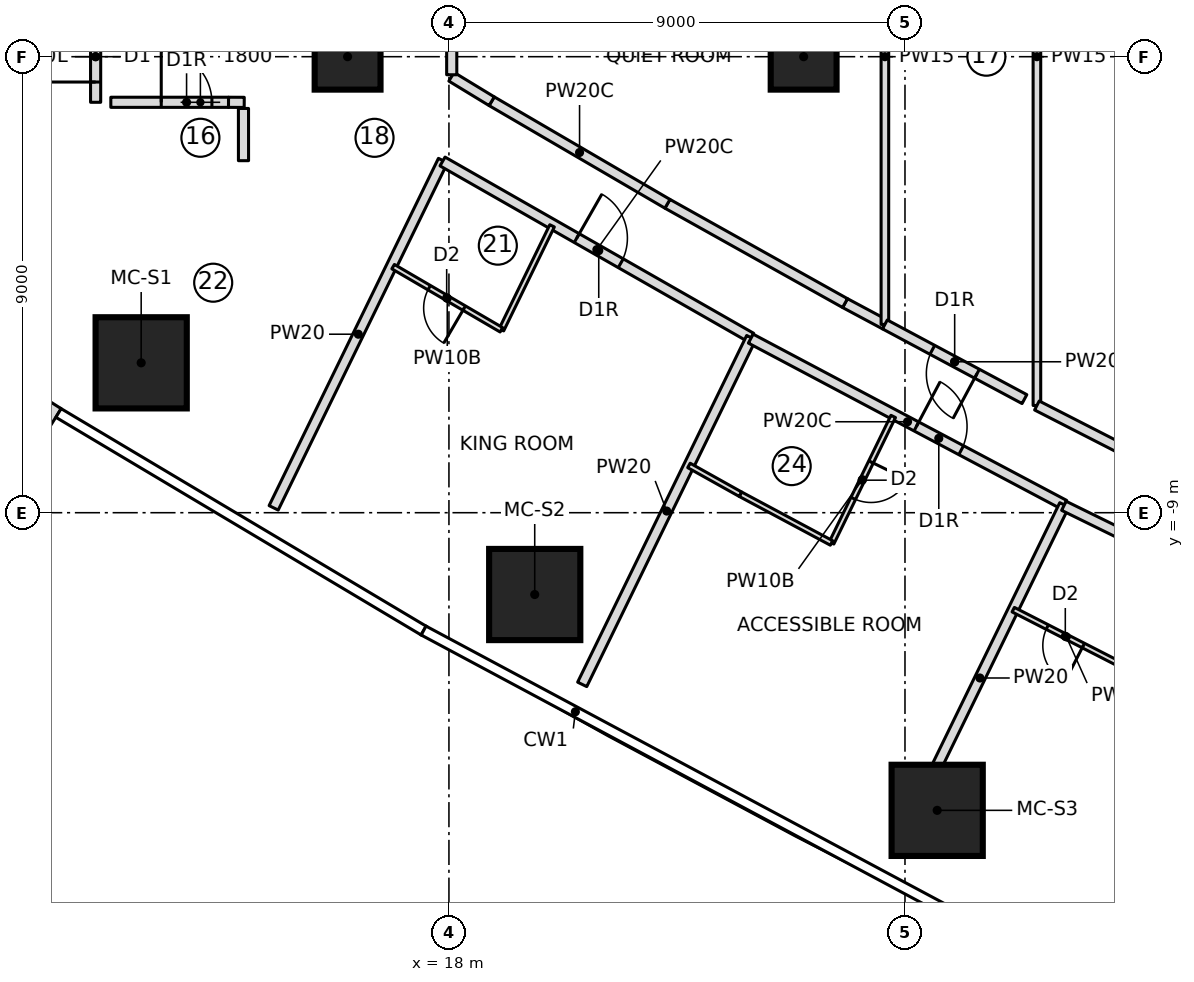
"""IFC4 building model, lengths in metres.
Left out: names, types, materials, properties, quantities, classifications, styles, units other than length and angle.
Written with IfcOpenShell. Run it as: python <this file> out.ifc"""

import sys

from ifc_helpers import new_model, si_unit, direction, frame, frame_2d, origin, origin_2d, place, context, subcontext, project, spatial, polyline, rectangle, outline, extrude, element, fill, save


model = new_model("IFC4")
c1 = context("Model", 3, precision=1e-05, world=origin(), true_north=direction((0.0, 1.0)))
c2 = subcontext(c1, "Body", "Model", "MODEL_VIEW")
j1 = project(units=[si_unit("LENGTHUNIT", "METRE"), si_unit("PLANEANGLEUNIT", "RADIAN")], contexts=[c1])
p1 = place(None, origin())
s1 = spatial("IfcSite", under=j1, at=p1, CompositionType="ELEMENT")
p2 = place(p1, origin())
s2 = spatial("IfcBuilding", under=s1, at=p2, CompositionType="ELEMENT")
p3 = place(p2, frame((0.0, 0.0, 71.55)))
s3 = spatial("IfcBuildingStorey", under=s2, at=p3, CompositionType="ELEMENT", Elevation=71.55)
for number, where, z_axis, x_axis in (
    (1, (11.927, -6.042, 0.0), (0.0, 0.0, 1.0), (1.0, 0.0, 0.0)),
    (2, (19.693, -10.615, 0.0), (0.0, 0.0, 1.0), (1.0, 0.0, 0.0)),
    (3, (27.635, -14.874, 0.0), (0.0, 0.0, 1.0), (1.0, 0.0, 0.0)),
):
    element("IfcColumn", number, at=place(p3, frame(where, z_axis=z_axis, x_axis=x_axis)), inside=s3, PredefinedType="COLUMN", context=c2, shape_type="SweptSolid", body=[
        extrude(rectangle(XDim=1.8, YDim=1.8, at=origin_2d()), origin(), (0.0, 0.0, 1.0), 3.55),
    ])
for number, where, z_axis, x_axis in (
    (4, (16.0, 0.0, 0.0), (0.0, 0.0, 1.0), (1.0, 0.0, 0.0)),
    (5, (25.0, 0.0, 0.0), (0.0, 0.0, 1.0), (1.0, 0.0, 0.0)),
):
    element("IfcColumn", number, at=place(p3, frame(where, z_axis=z_axis, x_axis=x_axis)), inside=s3, PredefinedType="COLUMN", context=c2, shape_type="SweptSolid", body=[
        extrude(rectangle(XDim=1.3, YDim=1.3, at=origin_2d()), origin(), (0.0, 0.0, 1.0), 3.55),
    ])
p4 = place(p3, frame((6.698, -4.87, 0.0), z_axis=(0.0, 0.0, 1.0), x_axis=(0.844551578623, -0.535474211372, 0.0)))
e6 = element("IfcWall", 6, at=p4, inside=s3, PredefinedType="NOTDEFINED", context=c2, shape_type="SweptSolid", body=[
    extrude(outline(polyline([(-0.034, -0.2), (4.196, -0.2), (4.196, 0.2), (0.034, 0.2), (-0.034, -0.2)])), origin(), (0.0, 0.0, 1.0), 3.25),
])
p5 = place(p4, frame((0.998, 0.0, 0.6)))
e7 = element("IfcOpeningElement", 7, at=p5, cuts=e6, PredefinedType="OPENING", context=c2, shape_type="SweptSolid", body=[
    extrude(outline(polyline([(0.0, 1.35), (0.084, 1.771), (0.322, 2.128), (0.679, 2.366), (1.1, 2.45), (1.521, 2.366), (1.878, 2.128), (2.116, 1.771), (2.2, 1.35), (2.2, 1.1), (2.116, 0.679), (1.878, 0.322), (1.521, 0.084), (1.1, 0.0), (0.679, 0.084), (0.322, 0.322), (0.084, 0.679), (0.0, 1.1), (0.0, 1.35)])), frame((0.0, 0.21, 0.0), z_axis=(0.0, -1.0, 0.0), x_axis=(1.0, 0.0, 0.0)), (0.0, 0.0, 1.0), 0.42),
])
p6 = place(p3, frame((11.027, -0.9, 0.0), z_axis=(0.0, 0.0, 1.0), x_axis=(0.0, 1.0, 0.0)))
e8 = element("IfcWall", 8, at=p6, inside=s3, PredefinedType="PARTITIONING", context=c2, shape_type="SweptSolid", body=[
    extrude(rectangle(XDim=1.8, YDim=0.2, at=frame_2d((0.9, 0.0))), origin(), (0.0, 0.0, 1.0), 3.15),
])
p7 = place(p6, frame((0.4, 0.0, 0.0)))
e9 = element("IfcOpeningElement", 9, at=p7, cuts=e8, PredefinedType="OPENING", context=c2, shape_type="SweptSolid", body=[
    extrude(rectangle(XDim=1.0, YDim=2.1, at=frame_2d((0.5, 1.05))), frame((0.0, 0.11, 0.0), z_axis=(0.0, -1.0, 0.0), x_axis=(1.0, 0.0, 0.0)), (0.0, 0.0, 1.0), 0.22),
])
p8 = place(p3, frame((14.541, -8.904, 0.0), z_axis=(0.0, 0.0, 1.0), x_axis=(0.438213564788, 0.898870887078, 0.0)))
e10 = element("IfcWall", 10, at=p8, inside=s3, PredefinedType="PARTITIONING", context=c2, shape_type="SweptSolid", body=[
    extrude(rectangle(XDim=7.625, YDim=0.2, at=frame_2d((3.813, 0.0))), origin(), (0.0, 0.0, 1.0), 3.15),
])
p9 = place(p3, frame((17.874, -2.068, 0.0), z_axis=(0.0, 0.0, 1.0), x_axis=(0.868427275315, -0.495816566373, 0.0)))
e11 = element("IfcWall", 11, at=p9, inside=s3, PredefinedType="PARTITIONING", context=c2, shape_type="SweptSolid", body=[
    extrude(rectangle(XDim=7.015, YDim=0.2, at=frame_2d((3.507, 0.0))), origin(), (0.0, 0.0, 1.0), 3.15),
])
p10 = place(p9, frame((3.05, 0.0, 0.0)))
e12 = element("IfcOpeningElement", 12, at=p10, cuts=e11, PredefinedType="OPENING", context=c2, shape_type="SweptSolid", body=[
    extrude(rectangle(XDim=1.0, YDim=2.1, at=frame_2d((0.5, 1.05))), frame((0.0, 0.11, 0.0), z_axis=(0.0, -1.0, 0.0), x_axis=(1.0, 0.0, 0.0)), (0.0, 0.0, 1.0), 0.22),
])
p11 = place(p3, frame((20.035, -3.338, 0.0), z_axis=(0.0, 0.0, 1.0), x_axis=(-0.438122322582, -0.898915363344, 0.0)))
e13 = element("IfcWall", 13, at=p11, inside=s3, PredefinedType="PARTITIONING", context=c2, shape_type="SweptSolid", body=[
    extrude(rectangle(XDim=2.283, YDim=0.1, at=frame_2d((1.142, 0.0))), origin(), (0.0, 0.0, 1.0), 3.15),
])
p12 = place(p3, frame((19.035, -5.39, 0.0), z_axis=(0.0, 0.0, 1.0), x_axis=(-0.863707305865, 0.503993739837, 0.0)))
e14 = element("IfcWall", 14, at=p12, inside=s3, PredefinedType="PARTITIONING", context=c2, shape_type="SweptSolid", body=[
    extrude(rectangle(XDim=2.474, YDim=0.1, at=frame_2d((1.237, 0.0))), origin(), (0.0, 0.0, 1.0), 3.15),
])
p13 = place(p12, frame((0.85, 0.0, 0.0)))
e15 = element("IfcOpeningElement", 15, at=p13, cuts=e14, PredefinedType="OPENING", context=c2, shape_type="SweptSolid", body=[
    extrude(rectangle(XDim=0.8, YDim=2.1, at=frame_2d((0.4, 1.05))), frame((0.0, 0.06, 0.0), z_axis=(0.0, -1.0, 0.0), x_axis=(1.0, 0.0, 0.0)), (0.0, 0.0, 1.0), 0.12),
])
p14 = place(p3, frame((20.63, -12.388, 0.0), z_axis=(0.0, 0.0, 1.0), x_axis=(0.438184754816, 0.898884931816, 0.0)))
e16 = element("IfcWall", 16, at=p14, inside=s3, PredefinedType="PARTITIONING", context=c2, shape_type="SweptSolid", body=[
    extrude(rectangle(XDim=7.612, YDim=0.2, at=frame_2d((3.806, 0.0))), origin(), (0.0, 0.0, 1.0), 3.15),
])
p15 = place(p3, frame((23.957, -5.564, 0.0), z_axis=(0.0, 0.0, 1.0), x_axis=(0.883455325405, -0.468515408513, 0.0)))
e17 = element("IfcWall", 17, at=p15, inside=s3, PredefinedType="PARTITIONING", context=c2, shape_type="SweptSolid", body=[
    extrude(rectangle(XDim=7.004, YDim=0.2, at=frame_2d((3.502, 0.0))), origin(), (0.0, 0.0, 1.0), 3.15),
])
p16 = place(p15, frame((3.7, 0.0, 0.0)))
e18 = element("IfcOpeningElement", 18, at=p16, cuts=e17, PredefinedType="OPENING", context=c2, shape_type="SweptSolid", body=[
    extrude(rectangle(XDim=1.0, YDim=2.1, at=frame_2d((0.5, 1.05))), frame((0.0, 0.11, 0.0), z_axis=(0.0, -1.0, 0.0), x_axis=(1.0, 0.0, 0.0)), (0.0, 0.0, 1.0), 0.22),
])
p17 = place(p3, frame((26.768, -7.1, 0.0), z_axis=(0.0, 0.0, 1.0), x_axis=(-0.43822975423, -0.898862994292, 0.0)))
e19 = element("IfcWall", 19, at=p17, inside=s3, PredefinedType="PARTITIONING", context=c2, shape_type="SweptSolid", body=[
    extrude(rectangle(XDim=2.779, YDim=0.1, at=frame_2d((1.389, 0.0))), origin(), (0.0, 0.0, 1.0), 3.15),
])
p18 = place(p17, frame((1.0, 0.0, 0.0)))
e20 = element("IfcOpeningElement", 20, at=p18, cuts=e19, PredefinedType="OPENING", context=c2, shape_type="SweptSolid", body=[
    extrude(rectangle(XDim=0.8, YDim=2.1, at=frame_2d((0.4, 1.05))), frame((0.0, 0.06, 0.0), z_axis=(0.0, -1.0, 0.0), x_axis=(1.0, 0.0, 0.0)), (0.0, 0.0, 1.0), 0.12),
])
p19 = place(p3, frame((25.55, -9.597, 0.0), z_axis=(0.0, 0.0, 1.0), x_axis=(-0.881675736231, 0.471855800156, 0.0)))
e21 = element("IfcWall", 21, at=p19, inside=s3, PredefinedType="PARTITIONING", context=c2, shape_type="SweptSolid", body=[
    extrude(rectangle(XDim=2.039, YDim=0.1, at=frame_2d((1.019, 0.0))), origin(), (0.0, 0.0, 1.0), 3.15),
])
p20 = place(p3, frame((23.753, -8.635, 0.0), z_axis=(0.0, 0.0, 1.0), x_axis=(-0.872799020153, 0.488079778745, 0.0)))
e22 = element("IfcWall", 22, at=p20, inside=s3, PredefinedType="PARTITIONING", context=c2, shape_type="SweptSolid", body=[
    extrude(rectangle(XDim=1.165, YDim=0.1, at=frame_2d((0.582, 0.0))), origin(), (0.0, 0.0, 1.0), 3.15),
])
p21 = place(p3, frame((26.813, -15.678, 0.0), z_axis=(0.0, 0.0, 1.0), x_axis=(0.438185054829, 0.898884785567, 0.0)))
e23 = element("IfcWall", 23, at=p21, inside=s3, PredefinedType="PARTITIONING", context=c2, shape_type="SweptSolid", body=[
    extrude(rectangle(XDim=7.601, YDim=0.2, at=frame_2d((3.801, 0.0))), origin(), (0.0, 0.0, 1.0), 3.15),
])
p22 = place(p3, frame((30.135, -8.864, 0.0), z_axis=(0.0, 0.0, 1.0), x_axis=(0.897599118183, -0.44081268475, 0.0)))
e24 = element("IfcWall", 24, at=p22, inside=s3, PredefinedType="PARTITIONING", context=c2, shape_type="SweptSolid", body=[
    extrude(rectangle(XDim=7.0, YDim=0.2, at=frame_2d((3.5, 0.0))), origin(), (0.0, 0.0, 1.0), 3.15),
])
p23 = place(p22, frame((4.25, 0.0, 0.0)))
e25 = element("IfcOpeningElement", 25, at=p23, cuts=e24, PredefinedType="OPENING", context=c2, shape_type="SweptSolid", body=[
    extrude(rectangle(XDim=1.0, YDim=2.1, at=frame_2d((0.5, 1.05))), frame((0.0, 0.11, 0.0), z_axis=(0.0, -1.0, 0.0), x_axis=(1.0, 0.0, 0.0)), (0.0, 0.0, 1.0), 0.22),
])
p24 = place(p3, frame((31.232, -11.986, 0.0), z_axis=(0.0, 0.0, 1.0), x_axis=(-0.890219804082, 0.45553122881, 0.0)))
e26 = element("IfcWall", 26, at=p24, inside=s3, PredefinedType="PARTITIONING", context=c2, shape_type="SweptSolid", body=[
    extrude(rectangle(XDim=2.354, YDim=0.1, at=frame_2d((1.177, 0.0))), origin(), (0.0, 0.0, 1.0), 3.15),
])
p25 = place(p24, frame((0.8, 0.0, 0.0)))
e27 = element("IfcOpeningElement", 27, at=p25, cuts=e26, PredefinedType="OPENING", context=c2, shape_type="SweptSolid", body=[
    extrude(rectangle(XDim=0.8, YDim=2.1, at=frame_2d((0.4, 1.05))), frame((0.0, 0.06, 0.0), z_axis=(0.0, -1.0, 0.0), x_axis=(1.0, 0.0, 0.0)), (0.0, 0.0, 1.0), 0.12),
])
p26 = place(p3, frame((26.604, -5.284, 0.0), z_axis=(0.0, 0.0, 1.0), x_axis=(-0.881715816073, 0.471780902207, 0.0)))
e28 = element("IfcWall", 28, at=p26, inside=s3, PredefinedType="PARTITIONING", context=c2, shape_type="SweptSolid", body=[
    extrude(rectangle(XDim=0.892, YDim=0.2, at=frame_2d((0.446, 0.0))), origin(), (0.0, 0.0, 1.0), 3.15),
])
p27 = place(p3, frame((25.817, -4.863, 0.0), z_axis=(0.0, 0.0, 1.0), x_axis=(-0.872800289292, 0.488077509225, 0.0)))
e29 = element("IfcWall", 29, at=p27, inside=s3, PredefinedType="PARTITIONING", context=c2, shape_type="SweptSolid", body=[
    extrude(rectangle(XDim=4.016, YDim=0.2, at=frame_2d((2.008, 0.0))), origin(), (0.0, 0.0, 1.0), 3.15),
])
p28 = place(p3, frame((22.312, -2.903, 0.0), z_axis=(0.0, 0.0, 1.0), x_axis=(-0.863710538269, 0.503988200341, 0.0)))
e30 = element("IfcWall", 30, at=p28, inside=s3, PredefinedType="PARTITIONING", context=c2, shape_type="SweptSolid", body=[
    extrude(rectangle(XDim=4.016, YDim=0.2, at=frame_2d((2.008, 0.0))), origin(), (0.0, 0.0, 1.0), 3.15),
])
p29 = place(p3, frame((18.844, -0.879, 0.0), z_axis=(0.0, 0.0, 1.0), x_axis=(-0.8542290073, 0.519896915828, 0.0)))
e31 = element("IfcWall", 31, at=p29, inside=s3, PredefinedType="PARTITIONING", context=c2, shape_type="SweptSolid", body=[
    extrude(rectangle(XDim=0.929, YDim=0.2, at=frame_2d((0.464, 0.0))), origin(), (0.0, 0.0, 1.0), 3.15),
])
p30 = place(p3, frame((26.604, -5.284, 0.0), z_axis=(0.0, 0.0, 1.0), x_axis=(0.0, 1.0, 0.0)))
e32 = element("IfcWall", 32, at=p30, inside=s3, PredefinedType="PARTITIONING", context=c2, shape_type="SweptSolid", body=[
    extrude(rectangle(XDim=10.568, YDim=0.15, at=frame_2d((5.284, 0.0))), origin(), (0.0, 0.0, 1.0), 3.15),
])
p31 = place(p3, frame((29.357, -6.758, 0.0), z_axis=(0.0, 0.0, 1.0), x_axis=(-0.881637943627, 0.471926409895, 0.0)))
e33 = element("IfcWall", 33, at=p31, inside=s3, PredefinedType="PARTITIONING", context=c2, shape_type="SweptSolid", body=[
    extrude(rectangle(XDim=3.124, YDim=0.2, at=frame_2d((1.562, 0.0))), origin(), (0.0, 0.0, 1.0), 3.15),
])
p32 = place(p31, frame((1.062, 0.0, 0.0)))
e34 = element("IfcOpeningElement", 34, at=p32, cuts=e33, PredefinedType="OPENING", context=c2, shape_type="SweptSolid", body=[
    extrude(rectangle(XDim=1.0, YDim=2.1, at=frame_2d((0.5, 1.05))), frame((0.0, 0.11, 0.0), z_axis=(0.0, -1.0, 0.0), x_axis=(1.0, 0.0, 0.0)), (0.0, 0.0, 1.0), 0.22),
])
p33 = place(p3, frame((29.604, -6.884, 0.0), z_axis=(0.0, 0.0, 1.0), x_axis=(0.0, 1.0, 0.0)))
e35 = element("IfcWall", 35, at=p33, inside=s3, PredefinedType="PARTITIONING", context=c2, shape_type="SweptSolid", body=[
    extrude(rectangle(XDim=13.768, YDim=0.15, at=frame_2d((6.884, 0.0))), origin(), (0.0, 0.0, 1.0), 3.15),
])
p34 = place(p3, frame((31.95, -8.085, 0.0), z_axis=(0.0, 0.0, 1.0), x_axis=(-0.890220210981, 0.455530433628, 0.0)))
e36 = element("IfcWall", 36, at=p34, inside=s3, PredefinedType="PARTITIONING", context=c2, shape_type="SweptSolid", body=[
    extrude(rectangle(XDim=2.636, YDim=0.2, at=frame_2d((1.318, 0.0))), origin(), (0.0, 0.0, 1.0), 3.15),
])
p35 = place(p3, frame((11.327, -0.9, 0.0), z_axis=(0.0, 0.0, 1.0), x_axis=(1.0, 0.0, 0.0)))
e37 = element("IfcWall", 37, at=p35, inside=s3, PredefinedType="PARTITIONING", context=c2, shape_type="SweptSolid", body=[
    extrude(rectangle(XDim=2.323, YDim=0.2, at=frame_2d((1.161, 0.0))), origin(), (0.0, 0.0, 1.0), 3.15),
])
p36 = place(p35, frame((0.995, 0.0, 0.0)))
e38 = element("IfcOpeningElement", 38, at=p36, cuts=e37, PredefinedType="OPENING", context=c2, shape_type="SweptSolid", body=[
    extrude(rectangle(XDim=1.0, YDim=2.1, at=frame_2d((0.5, 1.05))), frame((0.0, 0.11, 0.0), z_axis=(0.0, -1.0, 0.0), x_axis=(1.0, 0.0, 0.0)), (0.0, 0.0, 1.0), 0.22),
])
p37 = place(p3, frame((18.055, -0.357, 0.0), z_axis=(0.0, 0.0, 1.0), x_axis=(0.0, 1.0, 0.0)))
e39 = element("IfcWall", 39, at=p37, inside=s3, PredefinedType="PARTITIONING", context=c2, shape_type="SweptSolid", body=[
    extrude(rectangle(XDim=0.713, YDim=0.2, at=frame_2d((0.357, 0.0))), origin(), (0.0, 0.0, 1.0), 3.15),
])
p38 = place(p3, frame((13.65, -0.9, 0.0), z_axis=(0.0, 0.0, 1.0), x_axis=(0.999984810316, -0.005511727301, 0.0)))
e40 = element("IfcWall", 40, at=p38, inside=s3, PredefinedType="PARTITIONING", context=c2, shape_type="SweptSolid", body=[
    extrude(rectangle(XDim=0.31, YDim=0.2, at=frame_2d((0.155, 0.0))), origin(), (0.0, 0.0, 1.0), 3.15),
])
p39 = place(p3, frame((13.945, -1.021, 0.0), z_axis=(0.0, 0.0, 1.0), x_axis=(0.000473596916, -0.999999887853, 0.0)))
e41 = element("IfcWall", 41, at=p39, inside=s3, PredefinedType="PARTITIONING", context=c2, shape_type="SweptSolid", body=[
    extrude(rectangle(XDim=1.031, YDim=0.2, at=frame_2d((0.516, 0.0))), origin(), (0.0, 0.0, 1.0), 3.15),
])
p40 = place(p36, origin())
e42 = element("IfcDoor", 42, at=p40, inside=s3, OperationType="SINGLE_SWING_RIGHT", PredefinedType="DOOR", context=c2, shape_type="SweptSolid", body=[
    extrude(rectangle(XDim=1.0, YDim=2.1, at=frame_2d((0.5, 1.05))), frame((0.0, 0.025, 0.0), z_axis=(0.0, -1.0, 0.0), x_axis=(1.0, 0.0, 0.0)), (0.0, 0.0, 1.0), 0.05),
])
fill(e38, e42)
p41 = place(p7, origin())
e43 = element("IfcDoor", 43, at=p41, inside=s3, OperationType="SINGLE_SWING_LEFT", PredefinedType="DOOR", context=c2, shape_type="SweptSolid", body=[
    extrude(rectangle(XDim=1.0, YDim=2.1, at=frame_2d((0.5, 1.05))), frame((0.0, 0.025, 0.0), z_axis=(0.0, -1.0, 0.0), x_axis=(1.0, 0.0, 0.0)), (0.0, 0.0, 1.0), 0.05),
])
fill(e9, e43)
p42 = place(p13, origin())
e44 = element("IfcDoor", 44, at=p42, inside=s3, OperationType="SINGLE_SWING_LEFT", PredefinedType="DOOR", context=c2, shape_type="SweptSolid", body=[
    extrude(rectangle(XDim=0.8, YDim=2.1, at=frame_2d((0.4, 1.05))), frame((0.0, 0.025, 0.0), z_axis=(0.0, -1.0, 0.0), x_axis=(1.0, 0.0, 0.0)), (0.0, 0.0, 1.0), 0.05),
])
fill(e15, e44)
p43 = place(p10, origin())
e45 = element("IfcDoor", 45, at=p43, inside=s3, OperationType="SINGLE_SWING_RIGHT", PredefinedType="DOOR", context=c2, shape_type="SweptSolid", body=[
    extrude(rectangle(XDim=1.0, YDim=2.1, at=frame_2d((0.5, 1.05))), frame((0.0, 0.025, 0.0), z_axis=(0.0, -1.0, 0.0), x_axis=(1.0, 0.0, 0.0)), (0.0, 0.0, 1.0), 0.05),
])
fill(e12, e45)
p44 = place(p18, origin())
e46 = element("IfcDoor", 46, at=p44, inside=s3, OperationType="SINGLE_SWING_LEFT", PredefinedType="DOOR", context=c2, shape_type="SweptSolid", body=[
    extrude(rectangle(XDim=0.8, YDim=2.1, at=frame_2d((0.4, 1.05))), frame((0.0, 0.025, 0.0), z_axis=(0.0, -1.0, 0.0), x_axis=(1.0, 0.0, 0.0)), (0.0, 0.0, 1.0), 0.05),
])
fill(e20, e46)
p45 = place(p16, origin())
e47 = element("IfcDoor", 47, at=p45, inside=s3, OperationType="SINGLE_SWING_RIGHT", PredefinedType="DOOR", context=c2, shape_type="SweptSolid", body=[
    extrude(rectangle(XDim=1.0, YDim=2.1, at=frame_2d((0.5, 1.05))), frame((0.0, 0.025, 0.0), z_axis=(0.0, -1.0, 0.0), x_axis=(1.0, 0.0, 0.0)), (0.0, 0.0, 1.0), 0.05),
])
fill(e18, e47)
p46 = place(p25, origin())
e48 = element("IfcDoor", 48, at=p46, inside=s3, OperationType="SINGLE_SWING_LEFT", PredefinedType="DOOR", context=c2, shape_type="SweptSolid", body=[
    extrude(rectangle(XDim=0.8, YDim=2.1, at=frame_2d((0.4, 1.05))), frame((0.0, 0.025, 0.0), z_axis=(0.0, -1.0, 0.0), x_axis=(1.0, 0.0, 0.0)), (0.0, 0.0, 1.0), 0.05),
])
fill(e27, e48)
p47 = place(p32, origin())
e49 = element("IfcDoor", 49, at=p47, inside=s3, OperationType="SINGLE_SWING_RIGHT", PredefinedType="DOOR", context=c2, shape_type="SweptSolid", body=[
    extrude(rectangle(XDim=1.0, YDim=2.1, at=frame_2d((0.5, 1.05))), frame((0.0, 0.025, 0.0), z_axis=(0.0, -1.0, 0.0), x_axis=(1.0, 0.0, 0.0)), (0.0, 0.0, 1.0), 0.05),
])
fill(e34, e49)
save(model, sys.argv[1])
